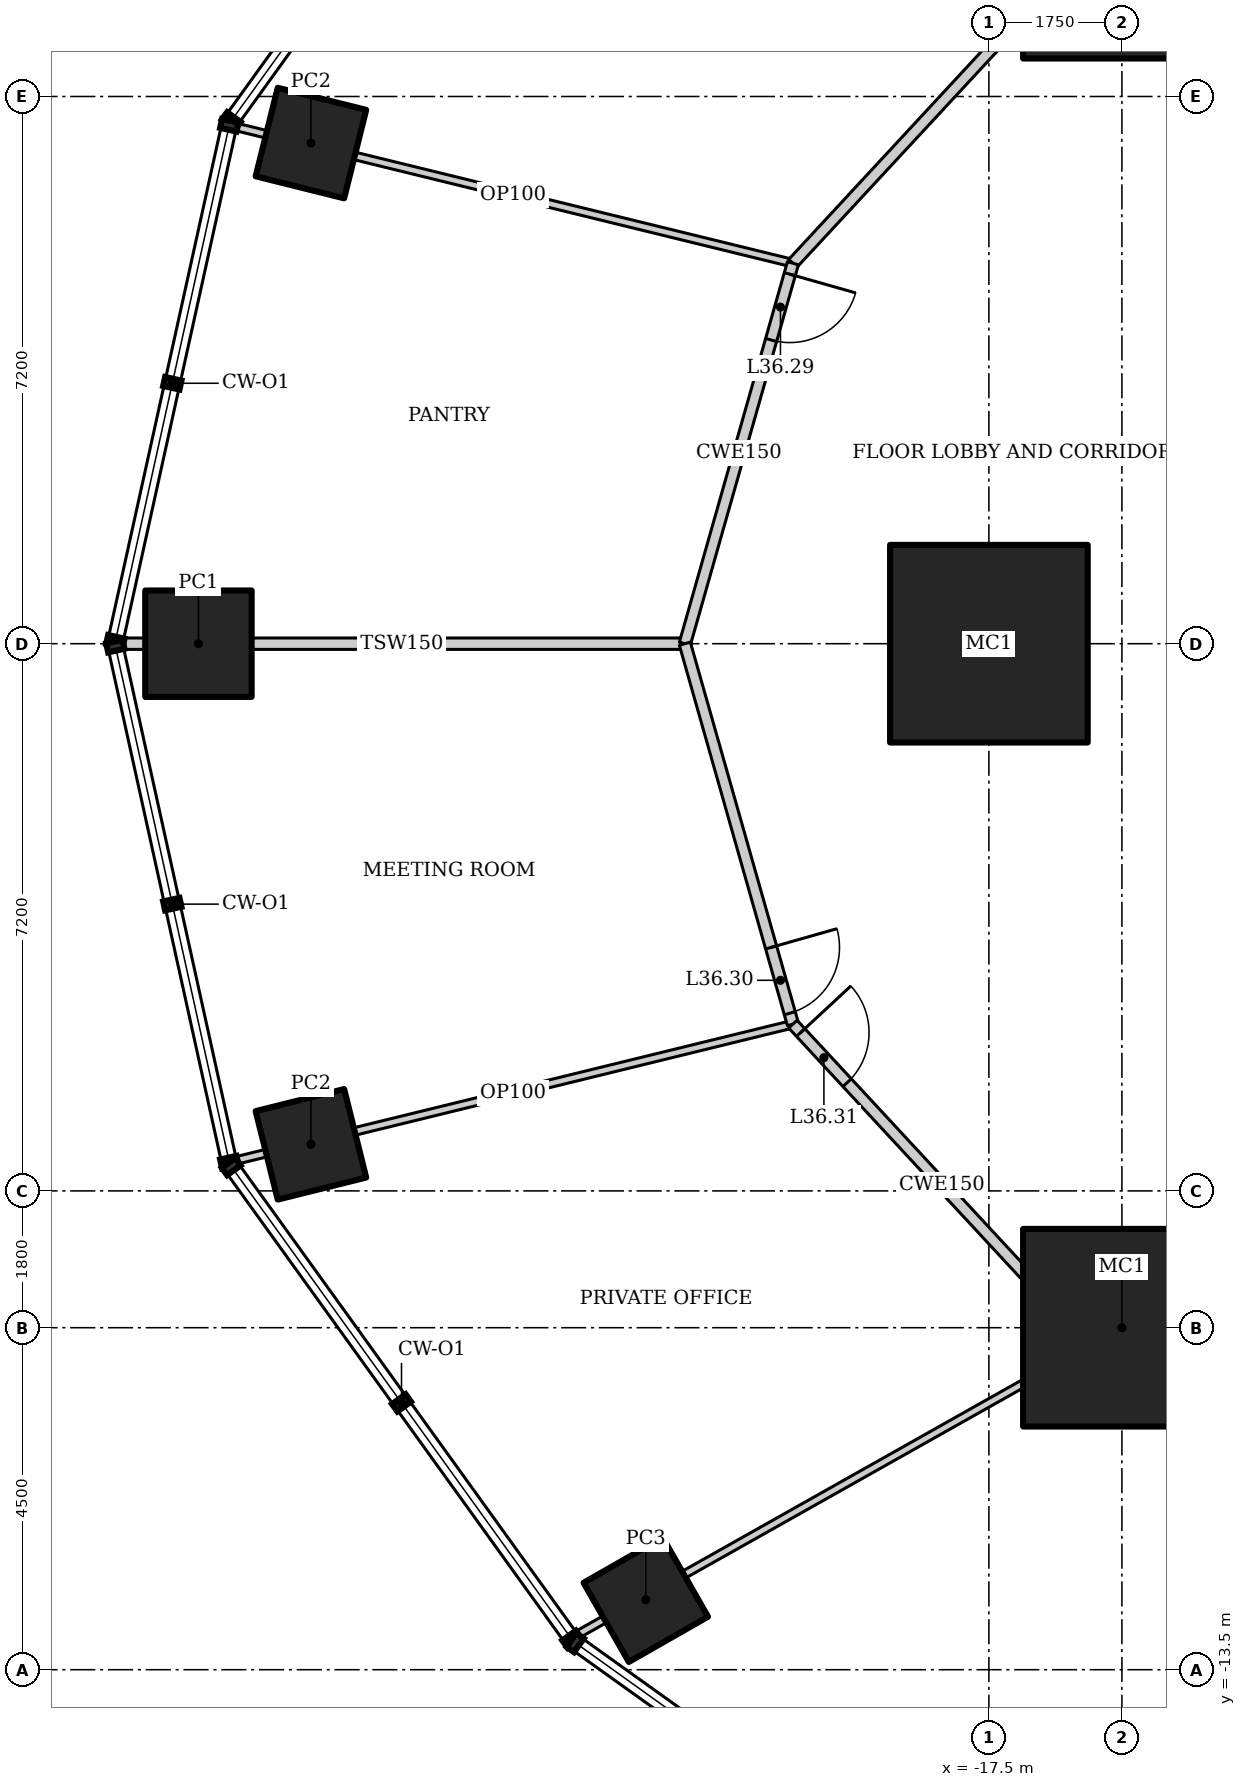
"""IFC4 building model, lengths in metres.
Left out: names, types, materials, properties, quantities, classifications, styles, units other than length and angle.
Written with IfcOpenShell. Run it as: python <this file> out.ifc"""

import sys

from ifc_helpers import new_model, si_unit, direction, frame, frame_2d, origin, origin_2d, place, context, subcontext, project, spatial, rectangle, hollow_rectangle, extrude, element, fill, save


model = new_model("IFC4")
c1 = context("Model", 3, precision=1e-05, world=origin(), true_north=direction((0.0, 1.0)))
c2 = subcontext(c1, "Body", "Model", "MODEL_VIEW")
j1 = project(units=[si_unit("LENGTHUNIT", "METRE"), si_unit("PLANEANGLEUNIT", "RADIAN")], contexts=[c1])
p1 = place(None, origin())
s1 = spatial("IfcSite", under=j1, at=p1, CompositionType="ELEMENT")
p2 = place(p1, origin())
s2 = spatial("IfcBuilding", under=s1, at=p2, CompositionType="ELEMENT")
p3 = place(p2, frame((0.0, 0.0, 155.2)))
s3 = spatial("IfcBuildingStorey", under=s2, at=p3, CompositionType="ELEMENT", Elevation=155.2)
for number, where, z_axis, x_axis in (
    (1, (-15.75, 9.0, 0.0), (0.0, 0.0, 1.0), (1.0, 0.0, 0.0)),
    (2, (-17.5, 0.0, 0.0), (0.0, 0.0, 1.0), (1.0, 0.0, 0.0)),
    (3, (-15.75, -9.0, 0.0), (0.0, 0.0, 1.0), (1.0, 0.0, 0.0)),
):
    element("IfcColumn", number, at=place(p3, frame(where, z_axis=z_axis, x_axis=x_axis)), inside=s3, PredefinedType="COLUMN", context=c2, shape_type="SweptSolid", body=[
        extrude(hollow_rectangle(XDim=2.6, YDim=2.6, WallThickness=0.13, at=origin_2d()), origin(), (0.0, 0.0, 1.0), 4.2),
    ])
p4 = place(p3, frame((-26.42, 6.587, 0.0), z_axis=(0.0, 0.0, 1.0), x_axis=(0.2419218956, 0.970295726276, 0.0)))
e4 = element("IfcColumn", 4, at=p4, inside=s3, PredefinedType="COLUMN", context=c2, shape_type="SweptSolid", body=[
    extrude(hollow_rectangle(XDim=1.2, YDim=1.2, WallThickness=0.1, at=origin_2d()), origin(), (0.0, 0.0, 1.0), 4.2),
])
p5 = place(p3, frame((-27.9, 0.0, 0.0), z_axis=(0.0, 0.0, 1.0), x_axis=(1.0, 0.0, 0.0)))
e5 = element("IfcColumn", 5, at=p5, inside=s3, PredefinedType="COLUMN", context=c2, shape_type="SweptSolid", body=[
    extrude(hollow_rectangle(XDim=1.4, YDim=1.4, WallThickness=0.1, at=origin_2d()), origin(), (0.0, 0.0, 1.0), 4.2),
])
p6 = place(p3, frame((-26.42, -6.587, 0.0), z_axis=(0.0, 0.0, 1.0), x_axis=(0.970295726276, 0.2419218956, 0.0)))
e6 = element("IfcColumn", 6, at=p6, inside=s3, PredefinedType="COLUMN", context=c2, shape_type="SweptSolid", body=[
    extrude(hollow_rectangle(XDim=1.2, YDim=1.2, WallThickness=0.1, at=origin_2d()), origin(), (0.0, 0.0, 1.0), 4.2),
])
p7 = place(p3, frame((-22.014, -12.579, 0.0), z_axis=(0.0, 0.0, 1.0), x_axis=(0.86824298017, 0.496139221777, 0.0)))
e7 = element("IfcColumn", 7, at=p7, inside=s3, PredefinedType="COLUMN", context=c2, shape_type="SweptSolid", body=[
    extrude(hollow_rectangle(XDim=1.2, YDim=1.2, WallThickness=0.12, at=origin_2d()), origin(), (0.0, 0.0, 1.0), 4.2),
])
p8 = place(p3, frame((-27.441, 6.809, 0.0), z_axis=(0.0, 0.0, 1.0), x_axis=(0.971305815804, -0.237834001323, 0.0)))
e8 = element("IfcWall", 8, at=p8, inside=s3, PredefinedType="PARTITIONING", context=c2, shape_type="SweptSolid", body=[
    extrude(rectangle(XDim=7.58, YDim=0.1, at=frame_2d((3.79, 0.0))), origin(), (0.0, 0.0, 1.0), 3.113),
])
p9 = place(p3, frame((-28.944, 0.0, 0.0), z_axis=(0.0, 0.0, 1.0), x_axis=(1.0, 0.0, 0.0)))
e9 = element("IfcWall", 9, at=p9, inside=s3, PredefinedType="PARTITIONING", context=c2, shape_type="SweptSolid", body=[
    extrude(rectangle(XDim=7.444, YDim=0.15, at=frame_2d((3.722, 0.0))), origin(), (0.0, 0.0, 1.0), 3.204),
])
p10 = place(p3, frame((-27.441, -6.809, 0.0), z_axis=(0.0, 0.0, 1.0), x_axis=(0.971305815804, 0.237834001323, 0.0)))
e10 = element("IfcWall", 10, at=p10, inside=s3, PredefinedType="PARTITIONING", context=c2, shape_type="SweptSolid", body=[
    extrude(rectangle(XDim=7.58, YDim=0.1, at=frame_2d((3.79, 0.0))), origin(), (0.0, 0.0, 1.0), 3.113),
])
p11 = place(p3, frame((-22.949, -13.059, 0.0), z_axis=(0.0, 0.0, 1.0), x_axis=(0.871274989434, 0.490795163777, 0.0)))
e11 = element("IfcWall", 11, at=p11, inside=s3, PredefinedType="PARTITIONING", context=c2, shape_type="SweptSolid", body=[
    extrude(rectangle(XDim=7.792, YDim=0.1, at=frame_2d((3.896, 0.0))), origin(), (0.0, 0.0, 1.0), 3.451),
])
p12 = place(p3, frame((-16.16, 9.234, 0.0), z_axis=(0.0, 0.0, 1.0), x_axis=(-0.679724658223, -0.733467374191, 0.0)))
e12 = element("IfcWall", 12, at=p12, inside=s3, PredefinedType="PARTITIONING", context=c2, shape_type="SweptSolid", body=[
    extrude(rectangle(XDim=5.765, YDim=0.15, at=frame_2d((2.882, 0.0))), origin(), (0.0, 0.0, 1.0), 4.05),
])
p13 = place(p3, frame((-20.078, 5.006, 0.0), z_axis=(0.0, 0.0, 1.0), x_axis=(-0.273177936169, -0.961963520717, 0.0)))
e13 = element("IfcWall", 13, at=p13, inside=s3, PredefinedType="PARTITIONING", context=c2, shape_type="SweptSolid", body=[
    extrude(rectangle(XDim=5.204, YDim=0.15, at=frame_2d((2.602, 0.0))), origin(), (0.0, 0.0, 1.0), 4.05),
])
p14 = place(p13, frame((0.15, 0.0, 0.0)))
e14 = element("IfcOpeningElement", 14, at=p14, cuts=e13, PredefinedType="OPENING", context=c2, shape_type="SweptSolid", body=[
    extrude(rectangle(XDim=0.9, YDim=2.1, at=frame_2d((0.45, 1.05))), frame((0.0, 0.085, 0.0), z_axis=(0.0, -1.0, 0.0), x_axis=(1.0, 0.0, 0.0)), (0.0, 0.0, 1.0), 0.17),
])
p15 = place(p3, frame((-21.5, 0.0, 0.0), z_axis=(0.0, 0.0, 1.0), x_axis=(0.273177936169, -0.961963520717, 0.0)))
e15 = element("IfcWall", 15, at=p15, inside=s3, PredefinedType="PARTITIONING", context=c2, shape_type="SweptSolid", body=[
    extrude(rectangle(XDim=5.204, YDim=0.15, at=frame_2d((2.602, 0.0))), origin(), (0.0, 0.0, 1.0), 4.05),
])
p16 = place(p15, frame((4.154, 0.0, 0.0)))
e16 = element("IfcOpeningElement", 16, at=p16, cuts=e15, PredefinedType="OPENING", context=c2, shape_type="SweptSolid", body=[
    extrude(rectangle(XDim=0.9, YDim=2.1, at=frame_2d((0.45, 1.05))), frame((0.0, 0.085, 0.0), z_axis=(0.0, -1.0, 0.0), x_axis=(1.0, 0.0, 0.0)), (0.0, 0.0, 1.0), 0.17),
])
p17 = place(p3, frame((-20.078, -5.006, 0.0), z_axis=(0.0, 0.0, 1.0), x_axis=(0.679724658223, -0.733467374191, 0.0)))
e17 = element("IfcWall", 17, at=p17, inside=s3, PredefinedType="PARTITIONING", context=c2, shape_type="SweptSolid", body=[
    extrude(rectangle(XDim=5.765, YDim=0.15, at=frame_2d((2.882, 0.0))), origin(), (0.0, 0.0, 1.0), 4.05),
])
p18 = place(p17, frame((0.15, 0.0, 0.0)))
e18 = element("IfcOpeningElement", 18, at=p18, cuts=e17, PredefinedType="OPENING", context=c2, shape_type="SweptSolid", body=[
    extrude(rectangle(XDim=0.9, YDim=2.1, at=frame_2d((0.45, 1.05))), frame((0.0, 0.085, 0.0), z_axis=(0.0, -1.0, 0.0), x_axis=(1.0, 0.0, 0.0)), (0.0, 0.0, 1.0), 0.17),
])
p19 = place(p3, frame((-16.16, -9.234, 0.0), z_axis=(0.0, 0.0, 1.0), x_axis=(0.87433873028, -0.485316169865, 0.0)))
e19 = element("IfcWall", 19, at=p19, inside=s3, PredefinedType="PARTITIONING", context=c2, shape_type="SweptSolid", body=[
    extrude(rectangle(XDim=5.393, YDim=0.15, at=frame_2d((2.696, 0.0))), origin(), (0.0, 0.0, 1.0), 4.05),
])
p20 = place(p14, origin())
e20 = element("IfcDoor", 20, at=p20, inside=s3, OperationType="SINGLE_SWING_LEFT", PredefinedType="DOOR", context=c2, shape_type="SweptSolid", body=[
    extrude(rectangle(XDim=0.9, YDim=2.1, at=frame_2d((0.45, 1.05))), frame((0.0, 0.025, 0.0), z_axis=(0.0, -1.0, 0.0), x_axis=(1.0, 0.0, 0.0)), (0.0, 0.0, 1.0), 0.05),
])
fill(e14, e20)
p21 = place(p16, origin())
e21 = element("IfcDoor", 21, at=p21, inside=s3, OperationType="SINGLE_SWING_LEFT", PredefinedType="DOOR", context=c2, shape_type="SweptSolid", body=[
    extrude(rectangle(XDim=0.9, YDim=2.1, at=frame_2d((0.45, 1.05))), frame((0.0, 0.025, 0.0), z_axis=(0.0, -1.0, 0.0), x_axis=(1.0, 0.0, 0.0)), (0.0, 0.0, 1.0), 0.05),
])
fill(e16, e21)
p22 = place(p18, origin())
e22 = element("IfcDoor", 22, at=p22, inside=s3, OperationType="SINGLE_SWING_LEFT", PredefinedType="DOOR", context=c2, shape_type="SweptSolid", body=[
    extrude(rectangle(XDim=0.9, YDim=2.1, at=frame_2d((0.45, 1.05))), frame((0.0, 0.025, 0.0), z_axis=(0.0, -1.0, 0.0), x_axis=(1.0, 0.0, 0.0)), (0.0, 0.0, 1.0), 0.05),
])
fill(e18, e22)
save(model, sys.argv[1])
